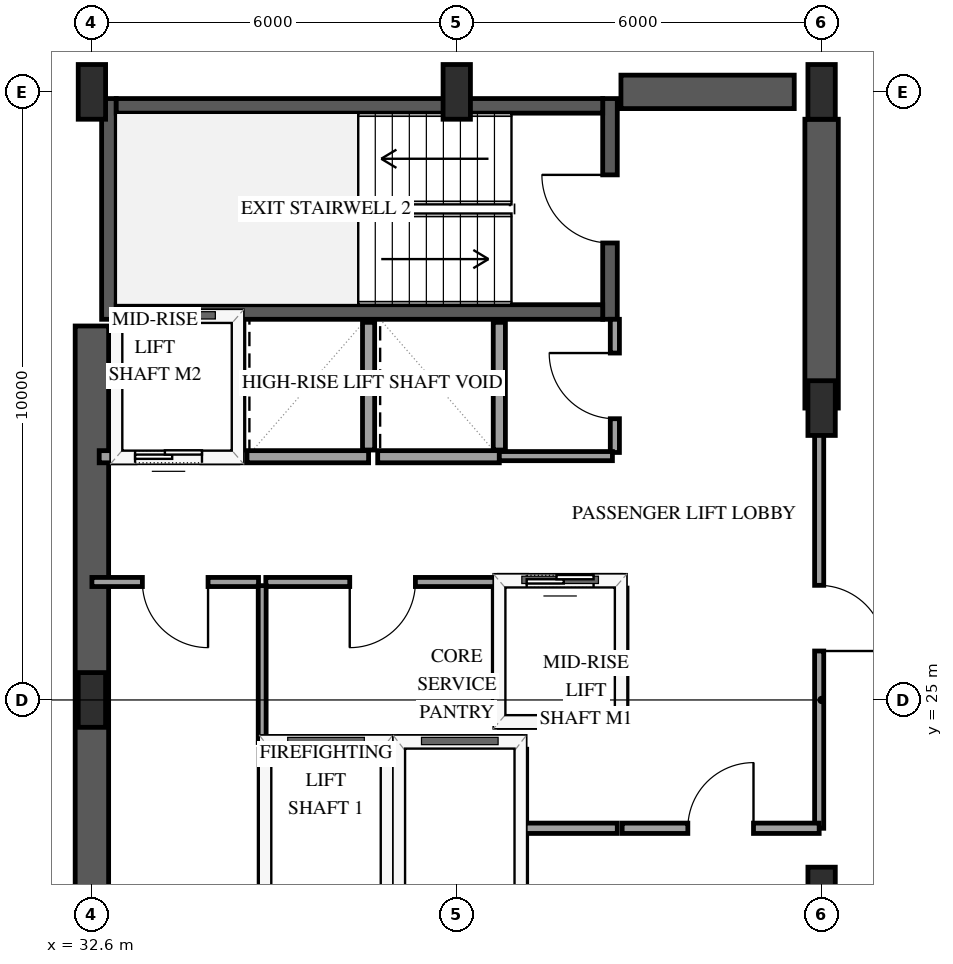
"""IFC4 building model, lengths in metres.
Left out: names, types, materials, properties, quantities, classifications, styles, units other than length and angle.
Written with IfcOpenShell. Run it as: python <this file> out.ifc"""

import sys

from ifc_helpers import new_model, si_unit, direction, frame, frame_2d, origin, origin_2d, place, context, subcontext, project, spatial, rectangle, extrude, element, fill, save


model = new_model("IFC4")
c1 = context("Model", 3, precision=1e-05, world=origin(), true_north=direction((0.0, 1.0)))
c2 = subcontext(c1, "Body", "Model", "MODEL_VIEW")
j1 = project(units=[si_unit("LENGTHUNIT", "METRE"), si_unit("PLANEANGLEUNIT", "RADIAN")], contexts=[c1])
p1 = place(None, origin())
s1 = spatial("IfcSite", under=j1, at=p1, CompositionType="ELEMENT")
p2 = place(p1, origin())
s2 = spatial("IfcBuilding", under=s1, at=p2, CompositionType="ELEMENT")
p3 = place(p2, frame((0.0, 0.0, 157.0)))
s3 = spatial("IfcBuildingStorey", under=s2, at=p3, CompositionType="ELEMENT", Elevation=157.0)
p4 = place(p3, frame((32.88, 31.26, 0.0), z_axis=(0.0, 0.0, 1.0), x_axis=(0.0, 1.0, 0.0)))
e1 = element("IfcWall", 1, at=p4, inside=s3, PredefinedType="SHEAR", context=c2, shape_type="SweptSolid", body=[
    extrude(rectangle(XDim=3.63, YDim=0.24, at=frame_2d((1.815, 0.0))), origin(), (0.0, 0.0, 1.0), 3.6),
])
p5 = place(p3, frame((41.12, 31.26, 0.0), z_axis=(0.0, 0.0, 1.0), x_axis=(0.0, 1.0, 0.0)))
e2 = element("IfcWall", 2, at=p5, inside=s3, PredefinedType="SHEAR", context=c2, shape_type="SweptSolid", body=[
    extrude(rectangle(XDim=3.63, YDim=0.24, at=frame_2d((1.815, 0.0))), origin(), (0.0, 0.0, 1.0), 3.6),
])
p6 = place(p5, frame((1.255, 0.0, 0.0)))
e3 = element("IfcOpeningElement", 3, at=p6, cuts=e2, PredefinedType="OPENING", context=c2, shape_type="SweptSolid", body=[
    extrude(rectangle(XDim=1.12, YDim=2.15, at=frame_2d((0.56, 1.075))), frame((0.0, 0.13, 0.0), z_axis=(0.0, -1.0, 0.0), x_axis=(1.0, 0.0, 0.0)), (0.0, 0.0, 1.0), 0.26),
])
for number, where, z_axis, x_axis in (
    (4, (33.0, 31.38, 0.0), (0.0, 0.0, 1.0), (1.0, 0.0, 0.0)),
    (5, (33.0, 34.77, 0.0), (0.0, 0.0, 1.0), (1.0, 0.0, 0.0)),
):
    element("IfcWall", number, at=place(p3, frame(where, z_axis=z_axis, x_axis=x_axis)), inside=s3, PredefinedType="SHEAR", context=c2, shape_type="SweptSolid", body=[
        extrude(rectangle(XDim=8.0, YDim=0.24, at=frame_2d((4.0, 0.0))), origin(), (0.0, 0.0, 1.0), 3.6),
    ])
p7 = place(p3, frame((32.6, 18.85, 0.0), z_axis=(0.0, 0.0, 1.0), x_axis=(0.0, 1.0, 0.0)))
e6 = element("IfcWall", 6, at=p7, inside=s3, PredefinedType="SHEAR", context=c2, shape_type="SweptSolid", body=[
    extrude(rectangle(XDim=12.3, YDim=0.55, at=frame_2d((6.15, 0.0))), origin(), (0.0, 0.0, 1.0), 3.6),
])
p8 = place(p3, frame((41.3, 35.0, 0.0), z_axis=(0.0, 0.0, 1.0), x_axis=(1.0, 0.0, 0.0)))
e7 = element("IfcWall", 7, at=p8, inside=s3, PredefinedType="SHEAR", context=c2, shape_type="SweptSolid", body=[
    extrude(rectangle(XDim=2.85, YDim=0.55, at=frame_2d((1.425, 0.0))), origin(), (0.0, 0.0, 1.0), 3.6),
])
p9 = place(p3, frame((44.6, 29.8, 0.0), z_axis=(0.0, 0.0, 1.0), x_axis=(0.0, 1.0, 0.0)))
e8 = element("IfcWall", 8, at=p9, inside=s3, PredefinedType="SHEAR", context=c2, shape_type="SweptSolid", body=[
    extrude(rectangle(XDim=4.75, YDim=0.55, at=frame_2d((2.375, 0.0))), origin(), (0.0, 0.0, 1.0), 3.6),
])
for number, where, z_axis, x_axis in (
    (9, (32.6, 25.0, 0.0), (0.0, 0.0, 1.0), (1.0, 0.0, 0.0)),
    (10, (32.6, 35.0, 0.0), (0.0, 0.0, 1.0), (1.0, 0.0, 0.0)),
    (11, (38.6, 35.0, 0.0), (0.0, 0.0, 1.0), (1.0, 0.0, 0.0)),
    (12, (44.6, 21.8, 0.0), (0.0, 0.0, 1.0), (1.0, 0.0, 0.0)),
    (13, (44.6, 29.8, 0.0), (0.0, 0.0, 1.0), (1.0, 0.0, 0.0)),
    (14, (44.6, 35.0, 0.0), (0.0, 0.0, 1.0), (1.0, 0.0, 0.0)),
):
    element("IfcColumn", number, at=place(p3, frame(where, z_axis=z_axis, x_axis=x_axis)), inside=s3, PredefinedType="PILASTER", context=c2, shape_type="SweptSolid", body=[
        extrude(rectangle(XDim=0.45, YDim=0.9, at=origin_2d()), origin(), (0.0, 0.0, 1.0), 3.6),
    ])
p10 = place(p3, frame((31.999, 37.854, 0.0), z_axis=(0.0, 0.0, 1.0), x_axis=(-0.643085925087, -0.765794027762, 0.0)))
e15 = element("IfcWall", 15, at=p10, inside=s3, PredefinedType="SOLIDWALL", context=c2, shape_type="SweptSolid", body=[
    extrude(rectangle(XDim=2.967, YDim=0.27, at=frame_2d((1.483, 0.0))), origin(), (0.0, 0.0, 1.0), 2.679),
])
p11 = place(p3, frame((35.45, 24.3, 0.0), z_axis=(0.0, 0.0, 1.0), x_axis=(1.0, 0.0, 0.0)))
e16 = element("IfcWall", 16, at=p11, inside=s3, PredefinedType="SOLIDWALL", context=c2, shape_type="SweptSolid", body=[
    extrude(rectangle(XDim=2.0, YDim=0.2, at=frame_2d((1.0, 0.0))), origin(), (0.0, 0.0, 1.0), 3.3),
])
for number, where, z_axis, x_axis in (
    (17, (35.45, 21.81, 0.0), (0.0, 0.0, 1.0), (0.0, 1.0, 0.0)),
    (18, (37.45, 21.81, 0.0), (0.0, 0.0, 1.0), (0.0, 1.0, 0.0)),
):
    element("IfcWall", number, at=place(p3, frame(where, z_axis=z_axis, x_axis=x_axis)), inside=s3, PredefinedType="SOLIDWALL", context=c2, shape_type="SweptSolid", body=[
        extrude(rectangle(XDim=2.38, YDim=0.2, at=frame_2d((1.19, 0.0))), origin(), (0.0, 0.0, 1.0), 3.3),
    ])
p12 = place(p3, frame((37.65, 24.3, 0.0), z_axis=(0.0, 0.0, 1.0), x_axis=(1.0, 0.0, 0.0)))
e19 = element("IfcWall", 19, at=p12, inside=s3, PredefinedType="SOLIDWALL", context=c2, shape_type="SweptSolid", body=[
    extrude(rectangle(XDim=2.0, YDim=0.2, at=frame_2d((1.0, 0.0))), origin(), (0.0, 0.0, 1.0), 3.3),
])
p13 = place(p3, frame((39.65, 21.81, 0.0), z_axis=(0.0, 0.0, 1.0), x_axis=(0.0, 1.0, 0.0)))
e20 = element("IfcWall", 20, at=p13, inside=s3, PredefinedType="SOLIDWALL", context=c2, shape_type="SweptSolid", body=[
    extrude(rectangle(XDim=2.38, YDim=0.2, at=frame_2d((1.19, 0.0))), origin(), (0.0, 0.0, 1.0), 3.3),
])
p14 = place(p3, frame((39.3, 24.65, 0.0), z_axis=(0.0, 0.0, 1.0), x_axis=(1.0, 0.0, 0.0)))
e21 = element("IfcWall", 21, at=p14, inside=s3, PredefinedType="SOLIDWALL", context=c2, shape_type="SweptSolid", body=[
    extrude(rectangle(XDim=2.0, YDim=0.2, at=frame_2d((1.0, 0.0))), origin(), (0.0, 0.0, 1.0), 3.3),
])
p15 = place(p3, frame((39.3, 26.95, 0.0), z_axis=(0.0, 0.0, 1.0), x_axis=(1.0, 0.0, 0.0)))
e22 = element("IfcWall", 22, at=p15, inside=s3, PredefinedType="SOLIDWALL", context=c2, shape_type="SweptSolid", body=[
    extrude(rectangle(XDim=2.0, YDim=0.2, at=frame_2d((1.0, 0.0))), origin(), (0.0, 0.0, 1.0), 3.3),
])
p16 = place(p15, frame((0.45, 0.0, 0.0)))
e23 = element("IfcOpeningElement", 23, at=p16, cuts=e22, PredefinedType="OPENING", context=c2, shape_type="SweptSolid", body=[
    extrude(rectangle(XDim=1.1, YDim=2.15, at=frame_2d((0.55, 1.075))), frame((0.0, 0.11, 0.0), z_axis=(0.0, -1.0, 0.0), x_axis=(1.0, 0.0, 0.0)), (0.0, 0.0, 1.0), 0.22),
])
for number, where, z_axis, x_axis in (
    (24, (39.3, 24.76, 0.0), (0.0, 0.0, 1.0), (0.0, 1.0, 0.0)),
    (25, (41.3, 24.76, 0.0), (0.0, 0.0, 1.0), (0.0, 1.0, 0.0)),
):
    element("IfcWall", number, at=place(p3, frame(where, z_axis=z_axis, x_axis=x_axis)), inside=s3, PredefinedType="SOLIDWALL", context=c2, shape_type="SweptSolid", body=[
        extrude(rectangle(XDim=2.08, YDim=0.2, at=frame_2d((1.04, 0.0))), origin(), (0.0, 0.0, 1.0), 3.3),
    ])
p17 = place(p3, frame((32.72, 29.0, 0.0), z_axis=(0.0, 0.0, 1.0), x_axis=(1.0, 0.0, 0.0)))
e26 = element("IfcWall", 26, at=p17, inside=s3, PredefinedType="SOLIDWALL", context=c2, shape_type="SweptSolid", body=[
    extrude(rectangle(XDim=2.28, YDim=0.2, at=frame_2d((1.14, 0.0))), origin(), (0.0, 0.0, 1.0), 3.3),
])
p18 = place(p17, frame((0.59, 0.0, 0.0)))
e27 = element("IfcOpeningElement", 27, at=p18, cuts=e26, PredefinedType="OPENING", context=c2, shape_type="SweptSolid", body=[
    extrude(rectangle(XDim=1.1, YDim=2.15, at=frame_2d((0.55, 1.075))), frame((0.0, 0.11, 0.0), z_axis=(0.0, -1.0, 0.0), x_axis=(1.0, 0.0, 0.0)), (0.0, 0.0, 1.0), 0.22),
])
p19 = place(p3, frame((35.0, 29.11, 0.0), z_axis=(0.0, 0.0, 1.0), x_axis=(0.0, 1.0, 0.0)))
e28 = element("IfcWall", 28, at=p19, inside=s3, PredefinedType="SOLIDWALL", context=c2, shape_type="SweptSolid", body=[
    extrude(rectangle(XDim=2.1, YDim=0.2, at=frame_2d((1.05, 0.0))), origin(), (0.0, 0.0, 1.0), 3.3),
])
p20 = place(p3, frame((35.15, 29.0, 0.0), z_axis=(0.0, 0.0, 1.0), x_axis=(1.0, 0.0, 0.0)))
e29 = element("IfcWall", 29, at=p20, inside=s3, PredefinedType="SOLIDWALL", context=c2, shape_type="SweptSolid", body=[
    extrude(rectangle(XDim=2.0, YDim=0.2, at=frame_2d((1.0, 0.0))), origin(), (0.0, 0.0, 1.0), 3.3),
])
p21 = place(p3, frame((37.15, 29.11, 0.0), z_axis=(0.0, 0.0, 1.0), x_axis=(0.0, 1.0, 0.0)))
e30 = element("IfcWall", 30, at=p21, inside=s3, PredefinedType="SOLIDWALL", context=c2, shape_type="SweptSolid", body=[
    extrude(rectangle(XDim=2.1, YDim=0.2, at=frame_2d((1.05, 0.0))), origin(), (0.0, 0.0, 1.0), 3.3),
])
p22 = place(p3, frame((37.3, 29.0, 0.0), z_axis=(0.0, 0.0, 1.0), x_axis=(1.0, 0.0, 0.0)))
e31 = element("IfcWall", 31, at=p22, inside=s3, PredefinedType="SOLIDWALL", context=c2, shape_type="SweptSolid", body=[
    extrude(rectangle(XDim=2.0, YDim=0.2, at=frame_2d((1.0, 0.0))), origin(), (0.0, 0.0, 1.0), 3.3),
])
p23 = place(p3, frame((39.3, 29.11, 0.0), z_axis=(0.0, 0.0, 1.0), x_axis=(0.0, 1.0, 0.0)))
e32 = element("IfcWall", 32, at=p23, inside=s3, PredefinedType="SOLIDWALL", context=c2, shape_type="SweptSolid", body=[
    extrude(rectangle(XDim=2.1, YDim=0.2, at=frame_2d((1.05, 0.0))), origin(), (0.0, 0.0, 1.0), 3.3),
])
p24 = place(p3, frame((44.56, 29.8, 0.0), z_axis=(0.0, 0.0, 1.0), x_axis=(0.0, -1.0, 0.0)))
e33 = element("IfcWall", 33, at=p24, inside=s3, PredefinedType="PARTITIONING", context=c2, shape_type="SweptSolid", body=[
    extrude(rectangle(XDim=6.91, YDim=0.15, at=frame_2d((3.455, 0.0))), origin(), (0.0, 0.0, 1.0), 2.34),
])
p25 = place(p24, frame((2.915, 0.0, 0.0)))
e34 = element("IfcOpeningElement", 34, at=p25, cuts=e33, PredefinedType="OPENING", context=c2, shape_type="SweptSolid", body=[
    extrude(rectangle(XDim=1.08, YDim=2.15, at=frame_2d((0.54, 1.075))), frame((0.0, 0.085, 0.0), z_axis=(0.0, -1.0, 0.0), x_axis=(1.0, 0.0, 0.0)), (0.0, 0.0, 1.0), 0.17),
])
p26 = place(p3, frame((39.3, 26.94, 0.0), z_axis=(0.0, 0.0, 1.0), x_axis=(-1.0, 0.0, 0.0)))
e35 = element("IfcWall", 35, at=p26, inside=s3, PredefinedType="PARTITIONING", context=c2, shape_type="SweptSolid", body=[
    extrude(rectangle(XDim=3.84, YDim=0.15, at=frame_2d((1.92, 0.0))), origin(), (0.0, 0.0, 1.0), 3.3),
])
p27 = place(p26, frame((1.38, 0.0, 0.0)))
e36 = element("IfcOpeningElement", 36, at=p27, cuts=e35, PredefinedType="OPENING", context=c2, shape_type="SweptSolid", body=[
    extrude(rectangle(XDim=1.08, YDim=2.15, at=frame_2d((0.54, 1.075))), frame((0.0, 0.085, 0.0), z_axis=(0.0, -1.0, 0.0), x_axis=(1.0, 0.0, 0.0)), (0.0, 0.0, 1.0), 0.17),
])
p28 = place(p3, frame((41.32, 22.89, 0.0), z_axis=(0.0, 0.0, 1.0), x_axis=(1.0, 0.0, 0.0)))
e37 = element("IfcWall", 37, at=p28, inside=s3, PredefinedType="PARTITIONING", context=c2, shape_type="SweptSolid", body=[
    extrude(rectangle(XDim=3.24, YDim=0.17, at=frame_2d((1.62, 0.0))), origin(), (0.0, 0.0, 1.0), 3.3),
])
p29 = place(p28, frame((1.08, 0.0, 0.0)))
e38 = element("IfcOpeningElement", 38, at=p29, cuts=e37, PredefinedType="OPENING", context=c2, shape_type="SweptSolid", body=[
    extrude(rectangle(XDim=1.08, YDim=2.15, at=frame_2d((0.54, 1.075))), frame((0.0, 0.095, 0.0), z_axis=(0.0, -1.0, 0.0), x_axis=(1.0, 0.0, 0.0)), (0.0, 0.0, 1.0), 0.19),
])
p30 = place(p3, frame((35.34, 26.94, 0.0), z_axis=(0.0, 0.0, 1.0), x_axis=(-1.0, 0.0, 0.0)))
e39 = element("IfcWall", 39, at=p30, inside=s3, PredefinedType="PARTITIONING", context=c2, shape_type="SweptSolid", body=[
    extrude(rectangle(XDim=2.74, YDim=0.15, at=frame_2d((1.37, 0.0))), origin(), (0.0, 0.0, 1.0), 3.3),
])
p31 = place(p30, frame((0.83, 0.0, 0.0)))
e40 = element("IfcOpeningElement", 40, at=p31, cuts=e39, PredefinedType="OPENING", context=c2, shape_type="SweptSolid", body=[
    extrude(rectangle(XDim=1.08, YDim=2.15, at=frame_2d((0.54, 1.075))), frame((0.0, 0.085, 0.0), z_axis=(0.0, -1.0, 0.0), x_axis=(1.0, 0.0, 0.0)), (0.0, 0.0, 1.0), 0.17),
])
p32 = place(p3, frame((35.4, 26.88, 0.0), z_axis=(0.0, 0.0, 1.0), x_axis=(0.0, -1.0, 0.0)))
e41 = element("IfcWall", 41, at=p32, inside=s3, PredefinedType="PARTITIONING", context=c2, shape_type="SweptSolid", body=[
    extrude(rectangle(XDim=2.58, YDim=0.13, at=frame_2d((1.29, 0.0))), origin(), (0.0, 0.0, 1.0), 3.3),
])
p33 = place(p3, frame((41.2, 29.07, 0.0), z_axis=(0.0, 0.0, 1.0), x_axis=(0.0, 1.0, 0.0)))
e42 = element("IfcWall", 42, at=p33, inside=s3, PredefinedType="PARTITIONING", context=c2, shape_type="SweptSolid", body=[
    extrude(rectangle(XDim=2.19, YDim=0.15, at=frame_2d((1.095, 0.0))), origin(), (0.0, 0.0, 1.0), 3.3),
])
p34 = place(p33, frame((0.555, 0.0, 0.0)))
e43 = element("IfcOpeningElement", 43, at=p34, cuts=e42, PredefinedType="OPENING", context=c2, shape_type="SweptSolid", body=[
    extrude(rectangle(XDim=1.08, YDim=2.15, at=frame_2d((0.54, 1.075))), frame((0.0, 0.085, 0.0), z_axis=(0.0, -1.0, 0.0), x_axis=(1.0, 0.0, 0.0)), (0.0, 0.0, 1.0), 0.17),
])
p35 = place(p3, frame((39.3, 29.01, 0.0), z_axis=(0.0, 0.0, 1.0), x_axis=(1.0, 0.0, 0.0)))
e44 = element("IfcWall", 44, at=p35, inside=s3, PredefinedType="PARTITIONING", context=c2, shape_type="SweptSolid", body=[
    extrude(rectangle(XDim=1.86, YDim=0.15, at=frame_2d((0.93, 0.0))), origin(), (0.0, 0.0, 1.0), 3.3),
])
p36 = place(p3, frame((39.72, 22.89, 0.0), z_axis=(0.0, 0.0, 1.0), x_axis=(1.0, 0.0, 0.0)))
e45 = element("IfcWall", 45, at=p36, inside=s3, PredefinedType="PARTITIONING", context=c2, shape_type="SweptSolid", body=[
    extrude(rectangle(XDim=1.52, YDim=0.17, at=frame_2d((0.76, 0.0))), origin(), (0.0, 0.0, 1.0), 3.3),
])
p37 = place(p16, origin())
e46 = element("IfcDoor", 46, at=p37, inside=s3, OperationType="SLIDING_TO_LEFT", PredefinedType="DOOR", context=c2, shape_type="SweptSolid", body=[
    extrude(rectangle(XDim=1.1, YDim=2.15, at=frame_2d((0.55, 1.075))), frame((0.0, 0.025, 0.0), z_axis=(0.0, -1.0, 0.0), x_axis=(1.0, 0.0, 0.0)), (0.0, 0.0, 1.0), 0.05),
])
fill(e23, e46)
p38 = place(p18, origin())
e47 = element("IfcDoor", 47, at=p38, inside=s3, OperationType="SLIDING_TO_LEFT", PredefinedType="DOOR", context=c2, shape_type="SweptSolid", body=[
    extrude(rectangle(XDim=1.1, YDim=2.15, at=frame_2d((0.55, 1.075))), frame((0.0, 0.025, 0.0), z_axis=(0.0, -1.0, 0.0), x_axis=(1.0, 0.0, 0.0)), (0.0, 0.0, 1.0), 0.05),
])
fill(e27, e47)
p39 = place(p6, origin())
e48 = element("IfcDoor", 48, at=p39, inside=s3, OperationType="SINGLE_SWING_RIGHT", PredefinedType="DOOR", context=c2, shape_type="SweptSolid", body=[
    extrude(rectangle(XDim=1.12, YDim=2.15, at=frame_2d((0.56, 1.075))), frame((0.0, 0.025, 0.0), z_axis=(0.0, -1.0, 0.0), x_axis=(1.0, 0.0, 0.0)), (0.0, 0.0, 1.0), 0.05),
])
fill(e3, e48)
p40 = place(p25, origin())
e49 = element("IfcDoor", 49, at=p40, inside=s3, OperationType="SINGLE_SWING_RIGHT", PredefinedType="DOOR", context=c2, shape_type="SweptSolid", body=[
    extrude(rectangle(XDim=1.08, YDim=2.15, at=frame_2d((0.54, 1.075))), frame((0.0, 0.025, 0.0), z_axis=(0.0, -1.0, 0.0), x_axis=(1.0, 0.0, 0.0)), (0.0, 0.0, 1.0), 0.05),
])
fill(e34, e49)
p41 = place(p27, origin())
e50 = element("IfcDoor", 50, at=p41, inside=s3, OperationType="SINGLE_SWING_RIGHT", PredefinedType="DOOR", context=c2, shape_type="SweptSolid", body=[
    extrude(rectangle(XDim=1.08, YDim=2.15, at=frame_2d((0.54, 1.075))), frame((0.0, 0.025, 0.0), z_axis=(0.0, -1.0, 0.0), x_axis=(1.0, 0.0, 0.0)), (0.0, 0.0, 1.0), 0.05),
])
fill(e36, e50)
p42 = place(p29, origin())
e51 = element("IfcDoor", 51, at=p42, inside=s3, OperationType="SINGLE_SWING_RIGHT", PredefinedType="DOOR", context=c2, shape_type="SweptSolid", body=[
    extrude(rectangle(XDim=1.08, YDim=2.15, at=frame_2d((0.54, 1.075))), frame((0.0, 0.025, 0.0), z_axis=(0.0, -1.0, 0.0), x_axis=(1.0, 0.0, 0.0)), (0.0, 0.0, 1.0), 0.05),
])
fill(e38, e51)
p43 = place(p31, origin())
e52 = element("IfcDoor", 52, at=p43, inside=s3, OperationType="SINGLE_SWING_LEFT", PredefinedType="DOOR", context=c2, shape_type="SweptSolid", body=[
    extrude(rectangle(XDim=1.08, YDim=2.15, at=frame_2d((0.54, 1.075))), frame((0.0, 0.025, 0.0), z_axis=(0.0, -1.0, 0.0), x_axis=(1.0, 0.0, 0.0)), (0.0, 0.0, 1.0), 0.05),
])
fill(e40, e52)
p44 = place(p34, origin())
e53 = element("IfcDoor", 53, at=p44, inside=s3, OperationType="SINGLE_SWING_RIGHT", PredefinedType="DOOR", context=c2, shape_type="SweptSolid", body=[
    extrude(rectangle(XDim=1.08, YDim=2.15, at=frame_2d((0.54, 1.075))), frame((0.0, 0.025, 0.0), z_axis=(0.0, -1.0, 0.0), x_axis=(1.0, 0.0, 0.0)), (0.0, 0.0, 1.0), 0.05),
])
fill(e43, e53)
save(model, sys.argv[1])
